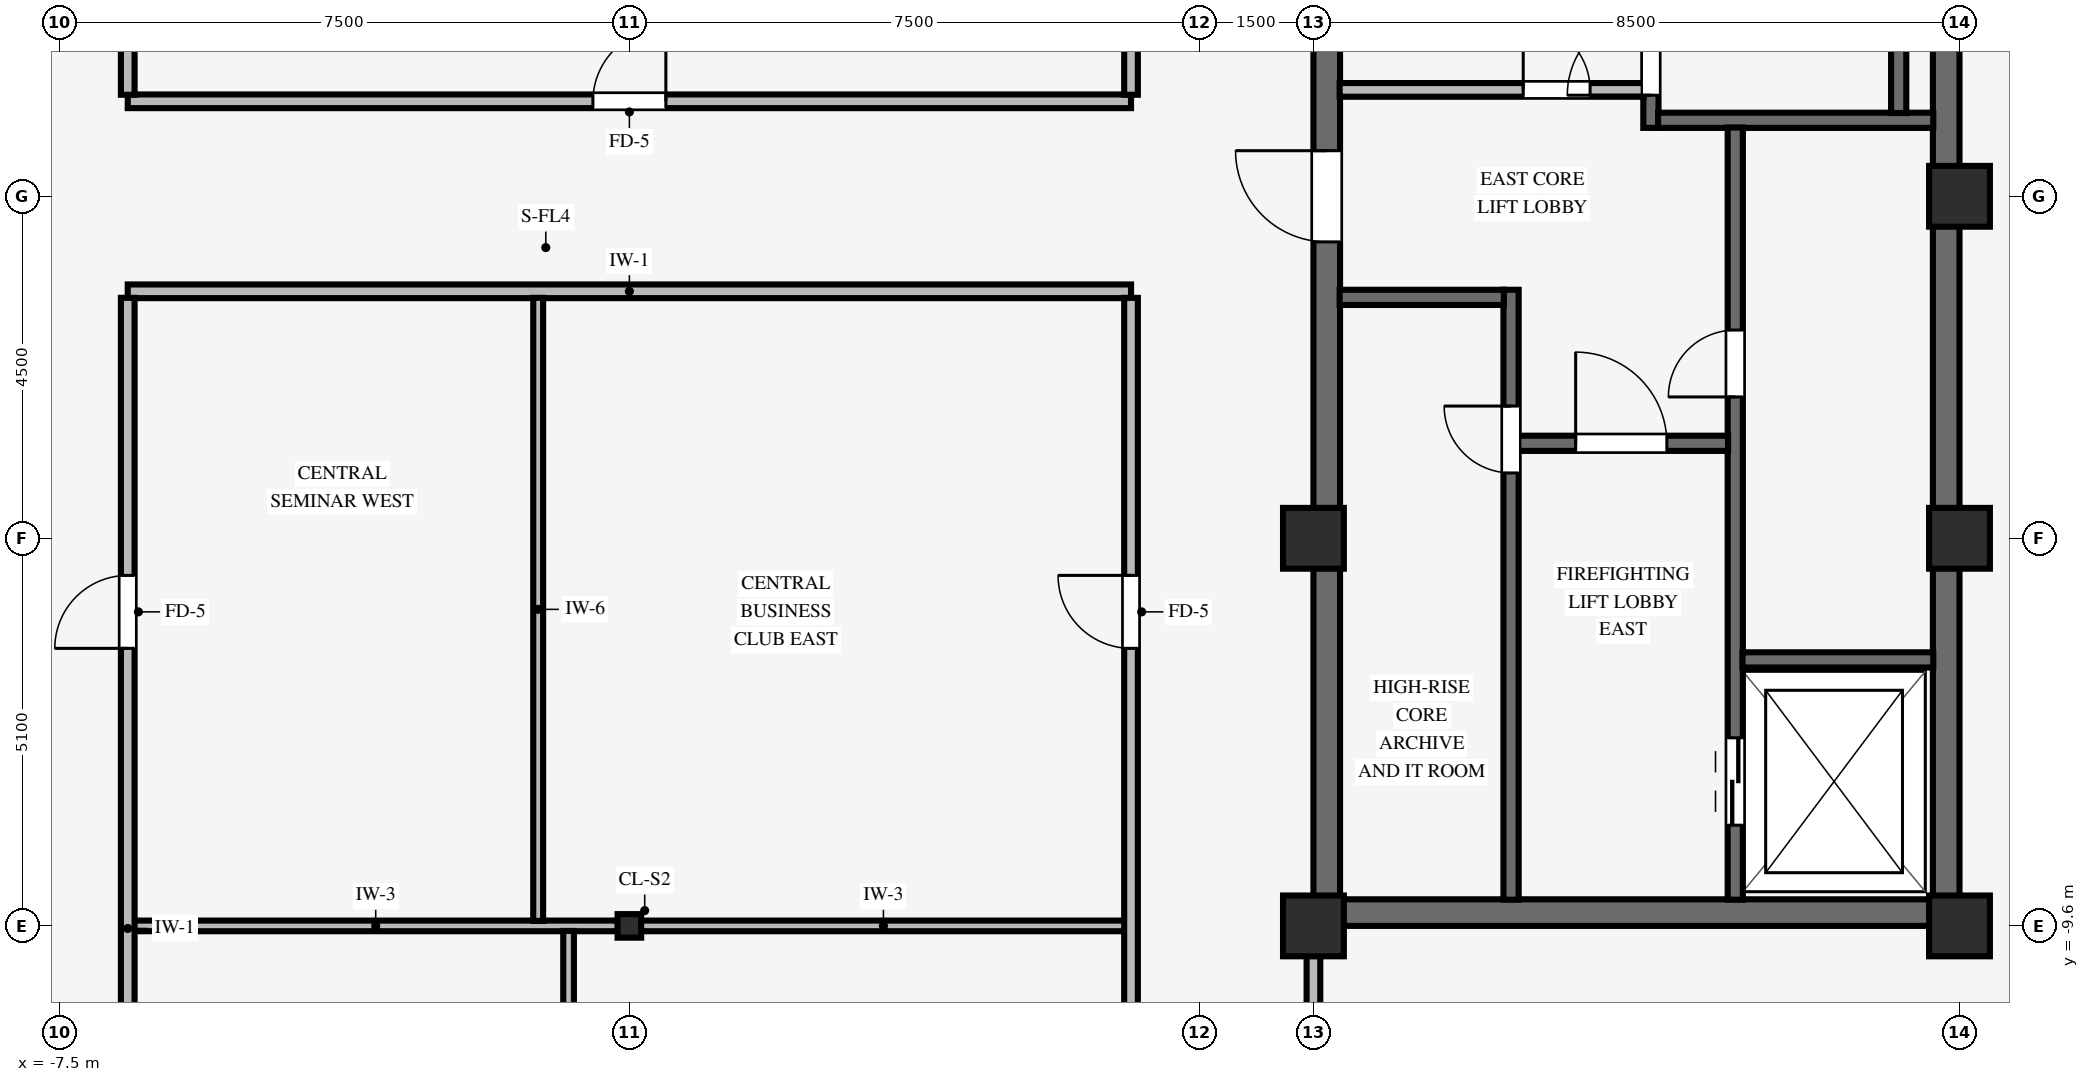
"""IFC4 building model, lengths in metres.
Left out: names, types, materials, properties, quantities, classifications, styles, units other than length and angle.
Written with IfcOpenShell. Run it as: python <this file> out.ifc"""

import sys

from ifc_helpers import new_model, si_unit, direction, frame, frame_2d, origin, origin_2d, place, context, subcontext, project, spatial, rectangle, i_section, extrude, source, transform, mapped, element, fill, save


model = new_model("IFC4")
c1 = context("Model", 3, precision=1e-05, world=origin(), true_north=direction((0.0, 1.0)))
c2 = subcontext(c1, "Body", "Model", "MODEL_VIEW")
j1 = project(units=[si_unit("LENGTHUNIT", "METRE"), si_unit("PLANEANGLEUNIT", "RADIAN")], contexts=[c1])
p1 = place(None, origin())
s1 = spatial("IfcSite", under=j1, at=p1, CompositionType="ELEMENT")
p2 = place(p1, origin())
s2 = spatial("IfcBuilding", under=s1, at=p2, CompositionType="ELEMENT")
p3 = place(p2, frame((0.0, 0.0, 257.95)))
s3 = spatial("IfcBuildingStorey", under=s2, at=p3, CompositionType="ELEMENT", Elevation=257.95)
p4 = place(p3, frame((9.0, -9.425, 0.0), z_axis=(0.0, 0.0, 1.0), x_axis=(1.0, 0.0, 0.0)))
e1 = element("IfcWall", 1, at=p4, inside=s3, PredefinedType="SHEAR", context=c2, shape_type="SweptSolid", body=[
    extrude(rectangle(XDim=8.5, YDim=0.35, at=frame_2d((4.25, 0.0))), origin(), (0.0, 0.0, 1.0), 3.37),
])
p5 = place(p3, frame((9.175, -9.255, 0.0), z_axis=(0.0, 0.0, 1.0), x_axis=(0.0, 1.0, 0.0)))
e2 = element("IfcWall", 2, at=p5, inside=s3, PredefinedType="SHEAR", context=c2, shape_type="SweptSolid", body=[
    extrude(rectangle(XDim=18.51, YDim=0.35, at=frame_2d((9.255, 0.0))), origin(), (0.0, 0.0, 1.0), 3.37),
])
p6 = place(p5, frame((8.655, 0.0, 0.0)))
e3 = element("IfcOpeningElement", 3, at=p6, cuts=e2, PredefinedType="OPENING", context=c2, shape_type="SweptSolid", body=[
    extrude(rectangle(XDim=1.2, YDim=2.15, at=frame_2d((0.6, 1.075))), frame((0.0, 0.185, 0.0), z_axis=(0.0, -1.0, 0.0), x_axis=(1.0, 0.0, 0.0)), (0.0, 0.0, 1.0), 0.37),
])
p7 = place(p3, frame((17.325, -9.255, 0.0), z_axis=(0.0, 0.0, 1.0), x_axis=(0.0, 1.0, 0.0)))
e4 = element("IfcWall", 4, at=p7, inside=s3, PredefinedType="SHEAR", context=c2, shape_type="SweptSolid", body=[
    extrude(rectangle(XDim=18.51, YDim=0.35, at=frame_2d((9.255, 0.0))), origin(), (0.0, 0.0, 1.0), 3.37),
])
for number, where, z_axis, x_axis in (
    (5, (9.0, -9.6, 0.0), (0.0, 0.0, 1.0), (1.0, 0.0, 0.0)),
    (6, (9.0, -4.5, 0.0), (0.0, 0.0, 1.0), (1.0, 0.0, 0.0)),
    (7, (17.5, -9.6, 0.0), (0.0, 0.0, 1.0), (1.0, 0.0, 0.0)),
    (8, (17.5, -4.5, 0.0), (0.0, 0.0, 1.0), (1.0, 0.0, 0.0)),
    (9, (17.5, 0.0, 0.0), (0.0, 0.0, 1.0), (1.0, 0.0, 0.0)),
):
    element("IfcColumn", number, at=place(p3, frame(where, z_axis=z_axis, x_axis=x_axis)), inside=s3, PredefinedType="COLUMN", context=c2, shape_type="SweptSolid", body=[
        extrude(rectangle(XDim=0.8, YDim=0.8, at=origin_2d()), origin(), (0.0, 0.0, 1.0), 3.37),
    ])
p8 = place(p3, frame((0.0, -9.6, 0.0), z_axis=(0.0, 0.0, 1.0), x_axis=(1.0, 0.0, 0.0)))
e10 = element("IfcColumn", 10, at=p8, inside=s3, PredefinedType="COLUMN", context=c2, shape_type="SweptSolid", body=[
    extrude(i_section(OverallWidth=0.31, OverallDepth=0.31, WebThickness=0.015, FlangeThickness=0.015, FilletRadius=0.015, at=origin_2d()), origin(), (0.0, 0.0, 1.0), 3.37),
])
p9 = place(p3, frame((13.44, 0.9, 0.0), z_axis=(0.0, 0.0, 1.0), x_axis=(0.0, 1.0, 0.0)))
e11 = element("IfcWall", 11, at=p9, inside=s3, PredefinedType="SHEAR", context=c2, shape_type="SweptSolid", body=[
    extrude(rectangle(XDim=8.355, YDim=0.2, at=frame_2d((4.177, 0.0))), origin(), (0.0, 0.0, 1.0), 3.37),
])
p10 = place(p9, frame((0.43, 0.0, 0.0)))
e12 = element("IfcOpeningElement", 12, at=p10, cuts=e11, PredefinedType="OPENING", context=c2, shape_type="SweptSolid", body=[
    extrude(rectangle(XDim=1.1, YDim=2.15, at=frame_2d((0.55, 1.075))), frame((0.0, 0.11, 0.0), z_axis=(0.0, -1.0, 0.0), x_axis=(1.0, 0.0, 0.0)), (0.0, 0.0, 1.0), 0.22),
])
p11 = place(p3, frame((13.535, 1.0, 0.0), z_axis=(0.0, 0.0, 1.0), x_axis=(1.0, 0.0, 0.0)))
e13 = element("IfcWall", 13, at=p11, inside=s3, PredefinedType="SHEAR", context=c2, shape_type="SweptSolid", body=[
    extrude(rectangle(XDim=3.62, YDim=0.2, at=frame_2d((1.81, 0.0))), origin(), (0.0, 0.0, 1.0), 3.37),
])
p12 = place(p3, frame((16.7, 1.095, 0.0), z_axis=(0.0, 0.0, 1.0), x_axis=(0.0, 1.0, 0.0)))
e14 = element("IfcWall", 14, at=p12, inside=s3, PredefinedType="SHEAR", context=c2, shape_type="SweptSolid", body=[
    extrude(rectangle(XDim=8.16, YDim=0.2, at=frame_2d((4.08, 0.0))), origin(), (0.0, 0.0, 1.0), 3.37),
])
p13 = place(p3, frame((14.55, -9.255, 0.0), z_axis=(0.0, 0.0, 1.0), x_axis=(0.0, 1.0, 0.0)))
e15 = element("IfcWall", 15, at=p13, inside=s3, PredefinedType="SHEAR", context=c2, shape_type="SweptSolid", body=[
    extrude(rectangle(XDim=10.16, YDim=0.2, at=frame_2d((5.08, 0.0))), origin(), (0.0, 0.0, 1.0), 3.37),
])
p14 = place(p13, frame((6.615, 0.0, 0.0)))
e16 = element("IfcOpeningElement", 16, at=p14, cuts=e15, PredefinedType="OPENING", context=c2, shape_type="SweptSolid", body=[
    extrude(rectangle(XDim=0.88, YDim=2.1, at=frame_2d((0.44, 1.05))), frame((0.0, 0.11, 0.0), z_axis=(0.0, -1.0, 0.0), x_axis=(1.0, 0.0, 0.0)), (0.0, 0.0, 1.0), 0.22),
])
p15 = place(p13, frame((0.98, 0.0, 0.0)))
e17 = element("IfcOpeningElement", 17, at=p15, cuts=e15, PredefinedType="OPENING", context=c2, shape_type="SweptSolid", body=[
    extrude(rectangle(XDim=1.15, YDim=2.15, at=frame_2d((0.575, 1.075))), frame((0.0, 0.11, 0.0), z_axis=(0.0, -1.0, 0.0), x_axis=(1.0, 0.0, 0.0)), (0.0, 0.0, 1.0), 0.22),
])
p16 = place(p3, frame((14.645, -6.1, 0.0), z_axis=(0.0, 0.0, 1.0), x_axis=(1.0, 0.0, 0.0)))
e18 = element("IfcWall", 18, at=p16, inside=s3, PredefinedType="SHEAR", context=c2, shape_type="SweptSolid", body=[
    extrude(rectangle(XDim=2.51, YDim=0.2, at=frame_2d((1.255, 0.0))), origin(), (0.0, 0.0, 1.0), 3.37),
])
p17 = place(p3, frame((11.6, -9.255, 0.0), z_axis=(0.0, 0.0, 1.0), x_axis=(0.0, 1.0, 0.0)))
e19 = element("IfcWall", 19, at=p17, inside=s3, PredefinedType="SHEAR", context=c2, shape_type="SweptSolid", body=[
    extrude(rectangle(XDim=8.025, YDim=0.2, at=frame_2d((4.012, 0.0))), origin(), (0.0, 0.0, 1.0), 3.37),
])
p18 = place(p17, frame((5.615, 0.0, 0.0)))
e20 = element("IfcOpeningElement", 20, at=p18, cuts=e19, PredefinedType="OPENING", context=c2, shape_type="SweptSolid", body=[
    extrude(rectangle(XDim=0.88, YDim=2.1, at=frame_2d((0.44, 1.05))), frame((0.0, 0.11, 0.0), z_axis=(0.0, -1.0, 0.0), x_axis=(1.0, 0.0, 0.0)), (0.0, 0.0, 1.0), 0.22),
])
p19 = place(p3, frame((11.695, -3.25, 0.0), z_axis=(0.0, 0.0, 1.0), x_axis=(1.0, 0.0, 0.0)))
e21 = element("IfcWall", 21, at=p19, inside=s3, PredefinedType="SHEAR", context=c2, shape_type="SweptSolid", body=[
    extrude(rectangle(XDim=2.76, YDim=0.2, at=frame_2d((1.38, 0.0))), origin(), (0.0, 0.0, 1.0), 3.37),
])
p20 = place(p19, frame((0.755, 0.0, 0.0)))
e22 = element("IfcOpeningElement", 22, at=p20, cuts=e21, PredefinedType="OPENING", context=c2, shape_type="SweptSolid", body=[
    extrude(rectangle(XDim=1.2, YDim=2.15, at=frame_2d((0.6, 1.075))), frame((0.0, 0.11, 0.0), z_axis=(0.0, -1.0, 0.0), x_axis=(1.0, 0.0, 0.0)), (0.0, 0.0, 1.0), 0.22),
])
p21 = place(p3, frame((9.345, -1.33, 0.0), z_axis=(0.0, 0.0, 1.0), x_axis=(1.0, 0.0, 0.0)))
e23 = element("IfcWall", 23, at=p21, inside=s3, PredefinedType="SHEAR", context=c2, shape_type="SweptSolid", body=[
    extrude(rectangle(XDim=2.16, YDim=0.2, at=frame_2d((1.08, 0.0))), origin(), (0.0, 0.0, 1.0), 3.37),
])
p22 = place(p3, frame((9.345, 1.4, 0.0), z_axis=(0.0, 0.0, 1.0), x_axis=(1.0, 0.0, 0.0)))
e24 = element("IfcWall", 24, at=p22, inside=s3, PredefinedType="PARTITIONING", context=c2, shape_type="SweptSolid", body=[
    extrude(rectangle(XDim=4.0, YDim=0.18, at=frame_2d((2.0, 0.0))), origin(), (0.0, 0.0, 1.0), 3.36),
])
p23 = place(p22, frame((2.415, 0.0, 0.0)))
e25 = element("IfcOpeningElement", 25, at=p23, cuts=e24, PredefinedType="OPENING", context=c2, shape_type="SweptSolid", body=[
    extrude(rectangle(XDim=0.88, YDim=2.1, at=frame_2d((0.44, 1.05))), frame((0.0, 0.1, 0.0), z_axis=(0.0, -1.0, 0.0), x_axis=(1.0, 0.0, 0.0)), (0.0, 0.0, 1.0), 0.2),
])
p24 = place(p3, frame((-6.524, -9.6, 0.0), z_axis=(0.0, 0.0, 1.0), x_axis=(1.0, 0.0, 0.0)))
e26 = element("IfcWall", 26, at=p24, inside=s3, PredefinedType="PARTITIONING", context=c2, shape_type="SweptSolid", body=[
    extrude(rectangle(XDim=6.373, YDim=0.14, at=frame_2d((3.187, 0.0))), origin(), (0.0, 0.0, 1.0), 2.405),
])
p25 = place(p3, frame((0.151, -9.6, 0.0), z_axis=(0.0, 0.0, 1.0), x_axis=(1.0, 0.0, 0.0)))
e27 = element("IfcWall", 27, at=p25, inside=s3, PredefinedType="PARTITIONING", context=c2, shape_type="SweptSolid", body=[
    extrude(rectangle(XDim=6.383, YDim=0.14, at=frame_2d((3.191, 0.0))), origin(), (0.0, 0.0, 1.0), 2.405),
])
p26 = place(p3, frame((-6.6, -1.25, 0.0), z_axis=(0.0, 0.0, 1.0), x_axis=(1.0, 0.0, 0.0)))
e28 = element("IfcWall", 28, at=p26, inside=s3, PredefinedType="PARTITIONING", context=c2, shape_type="SweptSolid", body=[
    extrude(rectangle(XDim=13.2, YDim=0.18, at=frame_2d((6.6, 0.0))), origin(), (0.0, 0.0, 1.0), 3.36),
])
p27 = place(p3, frame((-6.6, 1.25, 0.0), z_axis=(0.0, 0.0, 1.0), x_axis=(1.0, 0.0, 0.0)))
e29 = element("IfcWall", 29, at=p27, inside=s3, PredefinedType="PARTITIONING", context=c2, shape_type="SweptSolid", body=[
    extrude(rectangle(XDim=13.2, YDim=0.18, at=frame_2d((6.6, 0.0))), origin(), (0.0, 0.0, 1.0), 3.36),
])
p28 = place(p27, frame((6.12, 0.0, 0.0)))
e30 = element("IfcOpeningElement", 30, at=p28, cuts=e29, PredefinedType="OPENING", context=c2, shape_type="SweptSolid", body=[
    extrude(rectangle(XDim=0.96, YDim=2.1, at=frame_2d((0.48, 1.05))), frame((0.0, 0.1, 0.0), z_axis=(0.0, -1.0, 0.0), x_axis=(1.0, 0.0, 0.0)), (0.0, 0.0, 1.0), 0.2),
])
p29 = place(p3, frame((-6.6, -19.1, 0.0), z_axis=(0.0, 0.0, 1.0), x_axis=(0.0, 1.0, 0.0)))
e31 = element("IfcWall", 31, at=p29, inside=s3, PredefinedType="PARTITIONING", context=c2, shape_type="SweptSolid", body=[
    extrude(rectangle(XDim=17.764, YDim=0.18, at=frame_2d((8.882, 0.0))), origin(), (0.0, 0.0, 1.0), 3.36),
])
p30 = place(p29, frame((13.152, 0.0, 0.0)))
e32 = element("IfcOpeningElement", 32, at=p30, cuts=e31, PredefinedType="OPENING", context=c2, shape_type="SweptSolid", body=[
    extrude(rectangle(XDim=0.96, YDim=2.1, at=frame_2d((0.48, 1.05))), frame((0.0, 0.1, 0.0), z_axis=(0.0, -1.0, 0.0), x_axis=(1.0, 0.0, 0.0)), (0.0, 0.0, 1.0), 0.2),
])
p31 = place(p29, frame((4.82, 0.0, 0.0)))
e33 = element("IfcOpeningElement", 33, at=p31, cuts=e31, PredefinedType="OPENING", context=c2, shape_type="SweptSolid", body=[
    extrude(rectangle(XDim=0.96, YDim=2.1, at=frame_2d((0.48, 1.05))), frame((0.0, 0.1, 0.0), z_axis=(0.0, -1.0, 0.0), x_axis=(1.0, 0.0, 0.0)), (0.0, 0.0, 1.0), 0.2),
])
p32 = place(p3, frame((-6.6, 1.336, 0.0), z_axis=(0.0, 0.0, 1.0), x_axis=(0.0, 1.0, 0.0)))
e34 = element("IfcWall", 34, at=p32, inside=s3, PredefinedType="PARTITIONING", context=c2, shape_type="SweptSolid", body=[
    extrude(rectangle(XDim=8.178, YDim=0.18, at=frame_2d((4.089, 0.0))), origin(), (0.0, 0.0, 1.0), 3.36),
])
p33 = place(p3, frame((-1.2, -9.534, 0.0), z_axis=(0.0, 0.0, 1.0), x_axis=(0.0, 1.0, 0.0)))
e35 = element("IfcWall", 35, at=p33, inside=s3, PredefinedType="PARTITIONING", context=c2, shape_type="SweptSolid", body=[
    extrude(rectangle(XDim=8.198, YDim=0.13, at=frame_2d((4.099, 0.0))), origin(), (0.0, 0.0, 1.0), 3.36),
])
p34 = place(p3, frame((-0.8, -19.1, 0.0), z_axis=(0.0, 0.0, 1.0), x_axis=(0.0, 1.0, 0.0)))
e36 = element("IfcWall", 36, at=p34, inside=s3, PredefinedType="PARTITIONING", context=c2, shape_type="SweptSolid", body=[
    extrude(rectangle(XDim=9.434, YDim=0.14, at=frame_2d((4.717, 0.0))), origin(), (0.0, 0.0, 1.0), 3.36),
])
p35 = place(p3, frame((6.6, -19.1, 0.0), z_axis=(0.0, 0.0, 1.0), x_axis=(0.0, 1.0, 0.0)))
e37 = element("IfcWall", 37, at=p35, inside=s3, PredefinedType="PARTITIONING", context=c2, shape_type="SweptSolid", body=[
    extrude(rectangle(XDim=17.764, YDim=0.18, at=frame_2d((8.882, 0.0))), origin(), (0.0, 0.0, 1.0), 3.36),
])
p36 = place(p35, frame((13.152, 0.0, 0.0)))
e38 = element("IfcOpeningElement", 38, at=p36, cuts=e37, PredefinedType="OPENING", context=c2, shape_type="SweptSolid", body=[
    extrude(rectangle(XDim=0.96, YDim=2.1, at=frame_2d((0.48, 1.05))), frame((0.0, 0.1, 0.0), z_axis=(0.0, -1.0, 0.0), x_axis=(1.0, 0.0, 0.0)), (0.0, 0.0, 1.0), 0.2),
])
p37 = place(p35, frame((6.12, 0.0, 0.0)))
e39 = element("IfcOpeningElement", 39, at=p37, cuts=e37, PredefinedType="OPENING", context=c2, shape_type="SweptSolid", body=[
    extrude(rectangle(XDim=0.96, YDim=2.1, at=frame_2d((0.48, 1.05))), frame((0.0, 0.1, 0.0), z_axis=(0.0, -1.0, 0.0), x_axis=(1.0, 0.0, 0.0)), (0.0, 0.0, 1.0), 0.2),
])
p38 = place(p3, frame((6.6, 1.336, 0.0), z_axis=(0.0, 0.0, 1.0), x_axis=(0.0, 1.0, 0.0)))
e40 = element("IfcWall", 40, at=p38, inside=s3, PredefinedType="PARTITIONING", context=c2, shape_type="SweptSolid", body=[
    extrude(rectangle(XDim=8.178, YDim=0.18, at=frame_2d((4.089, 0.0))), origin(), (0.0, 0.0, 1.0), 3.36),
])
p39 = place(p3, frame((9.0, -15.314, 0.0), z_axis=(0.0, 0.0, 1.0), x_axis=(0.0, 1.0, 0.0)))
e41 = element("IfcWall", 41, at=p39, inside=s3, PredefinedType="PARTITIONING", context=c2, shape_type="SweptSolid", body=[
    extrude(rectangle(XDim=5.318, YDim=0.18, at=frame_2d((2.659, 0.0))), origin(), (0.0, 0.0, 1.0), 2.892),
])
p40 = place(p39, frame((2.179, 0.0, 0.0)))
e42 = element("IfcOpeningElement", 42, at=p40, cuts=e41, PredefinedType="OPENING", context=c2, shape_type="SweptSolid", body=[
    extrude(rectangle(XDim=0.96, YDim=2.1, at=frame_2d((0.48, 1.05))), frame((0.0, 0.1, 0.0), z_axis=(0.0, -1.0, 0.0), x_axis=(1.0, 0.0, 0.0)), (0.0, 0.0, 1.0), 0.2),
])
m1 = source(origin(), c2, "Body", "SweptSolid", [
    extrude(rectangle(XDim=1.1, YDim=2.15, at=frame_2d((0.55, 1.075))), frame((0.0, 0.025, 0.0), z_axis=(0.0, -1.0, 0.0), x_axis=(1.0, 0.0, 0.0)), (0.0, 0.0, 1.0), 0.05),
])
p41 = place(p10, origin())
e43 = element("IfcDoor", 43, at=p41, inside=s3, OperationType="SINGLE_SWING_LEFT", PredefinedType="DOOR", context=c2, shape_type="MappedRepresentation", body=[
    mapped(m1, transform((0.0, 0.0, 0.0), scale=1.0)),
])
fill(e12, e43)
m2 = source(origin(), c2, "Body", "SweptSolid", [
    extrude(rectangle(XDim=0.88, YDim=2.1, at=frame_2d((0.44, 1.05))), frame((0.0, 0.025, 0.0), z_axis=(0.0, -1.0, 0.0), x_axis=(1.0, 0.0, 0.0)), (0.0, 0.0, 1.0), 0.05),
])
p42 = place(p14, origin())
e44 = element("IfcDoor", 44, at=p42, inside=s3, OperationType="SINGLE_SWING_LEFT", PredefinedType="DOOR", context=c2, shape_type="MappedRepresentation", body=[
    mapped(m2, transform((0.0, 0.0, 0.0), scale=1.0)),
])
fill(e16, e44)
m3 = source(origin(), c2, "Body", "SweptSolid", [
    extrude(rectangle(XDim=1.2, YDim=2.15, at=frame_2d((0.6, 1.075))), frame((0.0, 0.025, 0.0), z_axis=(0.0, -1.0, 0.0), x_axis=(1.0, 0.0, 0.0)), (0.0, 0.0, 1.0), 0.05),
])
p43 = place(p20, origin())
e45 = element("IfcDoor", 45, at=p43, inside=s3, OperationType="SINGLE_SWING_LEFT", PredefinedType="DOOR", context=c2, shape_type="MappedRepresentation", body=[
    mapped(m3, transform((0.0, 0.0, 0.0), scale=1.0)),
])
fill(e22, e45)
p44 = place(p18, origin())
e46 = element("IfcDoor", 46, at=p44, inside=s3, OperationType="SINGLE_SWING_RIGHT", PredefinedType="DOOR", context=c2, shape_type="MappedRepresentation", body=[
    mapped(m2, transform((0.0, 0.0, 0.0), scale=1.0)),
])
fill(e20, e46)
p45 = place(p6, origin())
e47 = element("IfcDoor", 47, at=p45, inside=s3, OperationType="SINGLE_SWING_RIGHT", PredefinedType="DOOR", context=c2, shape_type="MappedRepresentation", body=[
    mapped(m3, transform((0.0, 0.0, 0.0), scale=1.0)),
])
fill(e3, e47)
p46 = place(p23, origin())
e48 = element("IfcDoor", 48, at=p46, inside=s3, OperationType="SINGLE_SWING_LEFT", PredefinedType="DOOR", context=c2, shape_type="MappedRepresentation", body=[
    mapped(m2, transform((0.0, 0.0, 0.0), scale=1.0)),
])
fill(e25, e48)
m4 = source(origin(), c2, "Body", "SweptSolid", [
    extrude(rectangle(XDim=1.15, YDim=2.15, at=frame_2d((0.575, 1.075))), frame((0.0, 0.025, 0.0), z_axis=(0.0, -1.0, 0.0), x_axis=(1.0, 0.0, 0.0)), (0.0, 0.0, 1.0), 0.05),
])
p47 = place(p15, origin())
e49 = element("IfcDoor", 49, at=p47, inside=s3, OperationType="DOUBLE_DOOR_SLIDING", PredefinedType="DOOR", context=c2, shape_type="MappedRepresentation", body=[
    mapped(m4, transform((0.0, 0.0, 0.0), scale=1.0)),
])
fill(e17, e49)
m5 = source(origin(), c2, "Body", "SweptSolid", [
    extrude(rectangle(XDim=0.96, YDim=2.1, at=frame_2d((0.48, 1.05))), frame((0.0, 0.025, 0.0), z_axis=(0.0, -1.0, 0.0), x_axis=(1.0, 0.0, 0.0)), (0.0, 0.0, 1.0), 0.05),
])
p48 = place(p28, origin())
e50 = element("IfcDoor", 50, at=p48, inside=s3, OperationType="SINGLE_SWING_RIGHT", PredefinedType="DOOR", context=c2, shape_type="MappedRepresentation", body=[
    mapped(m5, transform((0.0, 0.0, 0.0), scale=1.0)),
])
fill(e30, e50)
p49 = place(p30, origin())
e51 = element("IfcDoor", 51, at=p49, inside=s3, OperationType="SINGLE_SWING_LEFT", PredefinedType="DOOR", context=c2, shape_type="MappedRepresentation", body=[
    mapped(m5, transform((0.0, 0.0, 0.0), scale=1.0)),
])
fill(e32, e51)
p50 = place(p36, origin())
e52 = element("IfcDoor", 52, at=p50, inside=s3, OperationType="SINGLE_SWING_RIGHT", PredefinedType="DOOR", context=c2, shape_type="MappedRepresentation", body=[
    mapped(m5, transform((0.0, 0.0, 0.0), scale=1.0)),
])
fill(e38, e52)
save(model, sys.argv[1])
